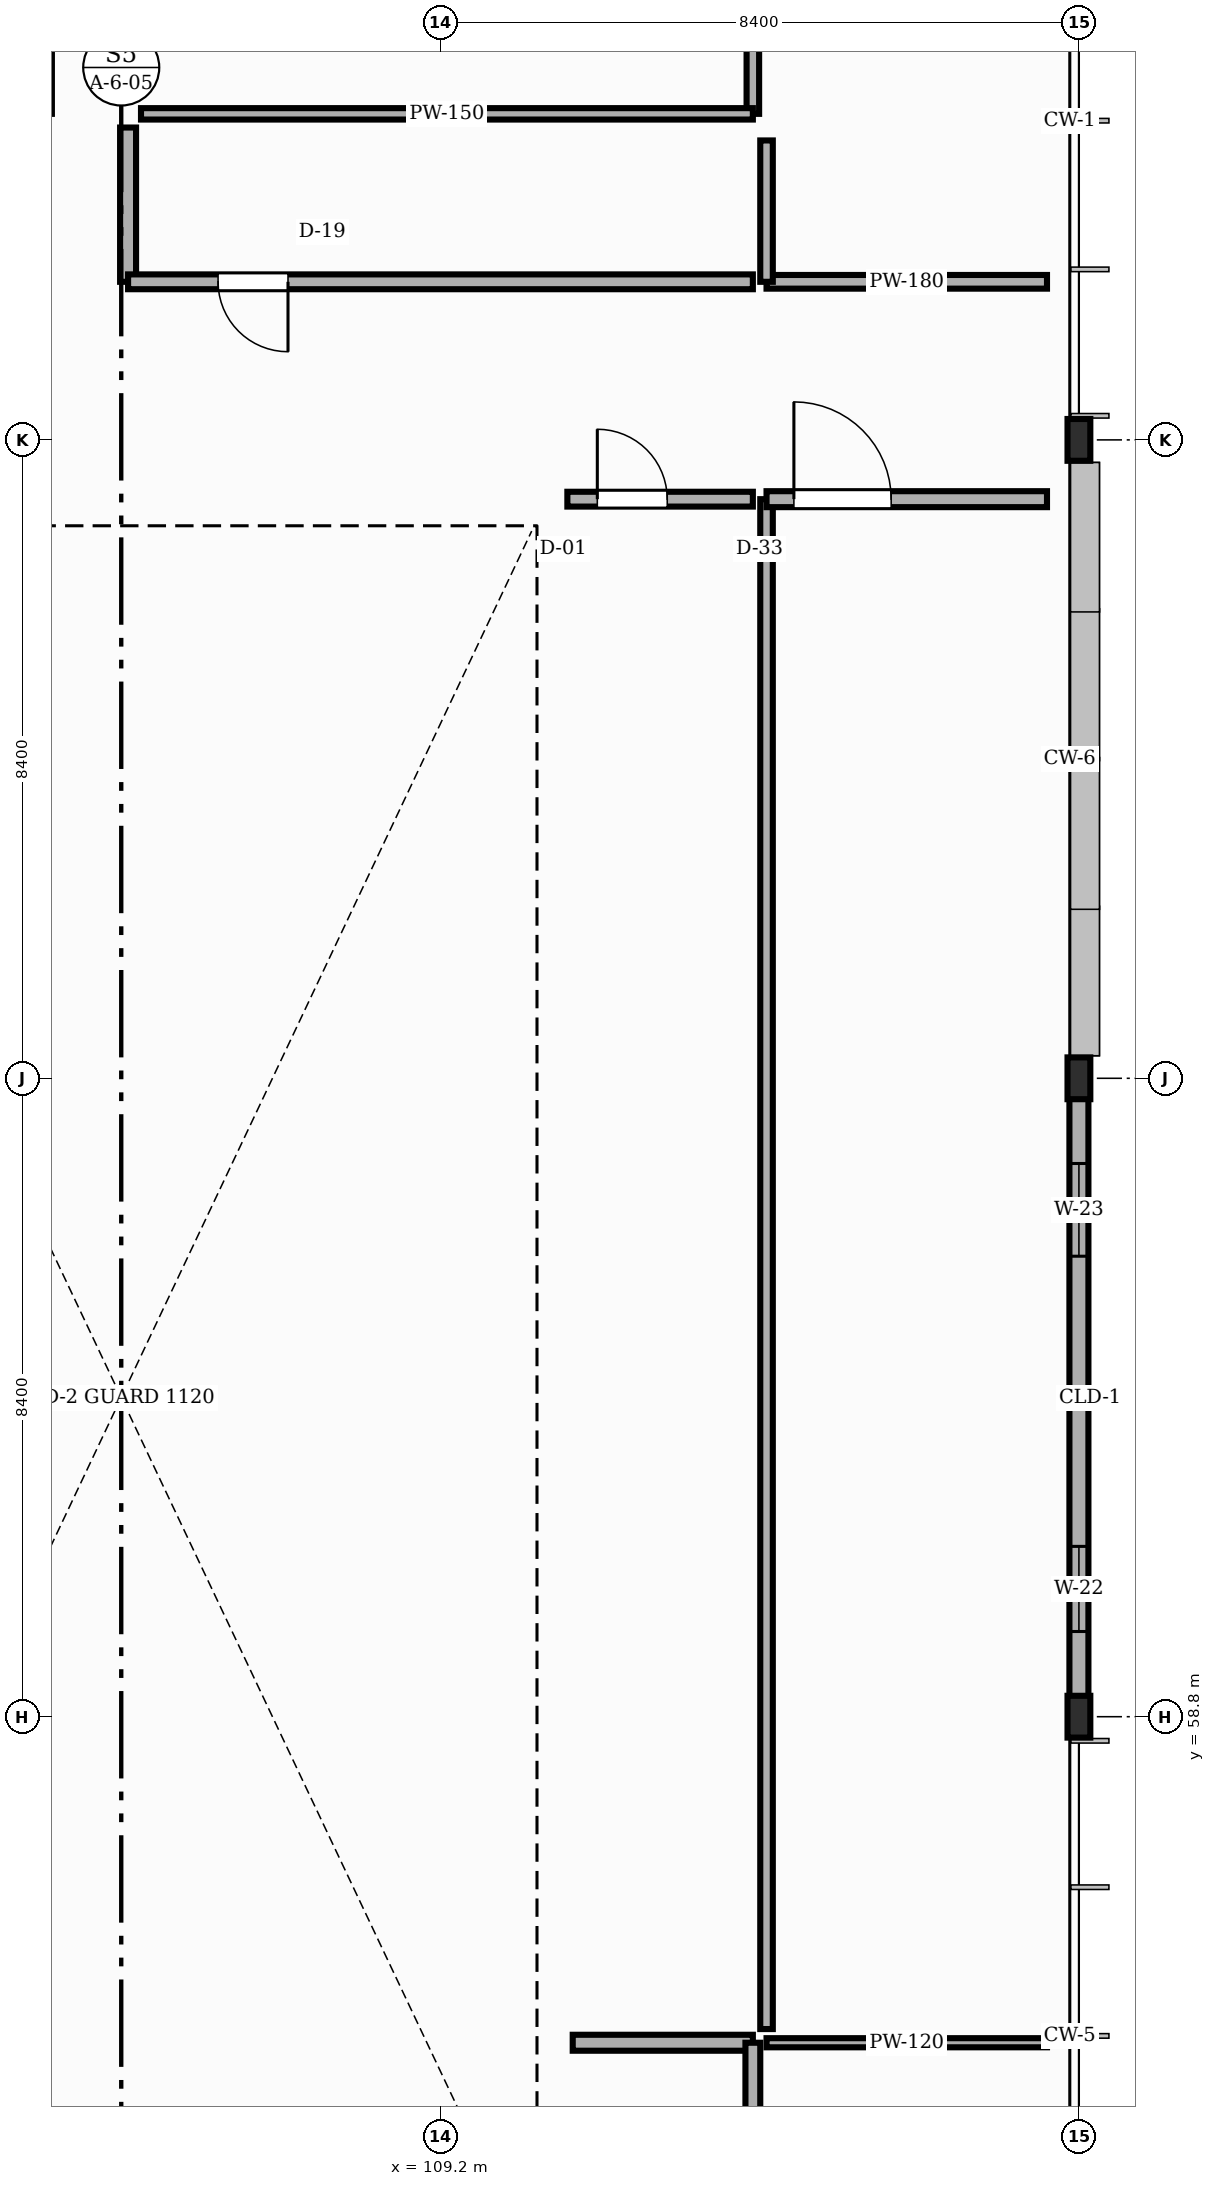
"""IFC4 building model, lengths in metres.
Left out: names, types, materials, properties, quantities, classifications, styles, units other than length and angle.
Written with IfcOpenShell. Run it as: python <this file> out.ifc"""

import sys

from ifc_helpers import new_model, si_unit, direction, frame, frame_2d, origin, origin_2d, place, context, subcontext, project, spatial, rectangle, i_section, extrude, element, fill, save


model = new_model("IFC4")
c1 = context("Model", 3, precision=1e-05, world=origin(), true_north=direction((0.0, 1.0)))
c2 = subcontext(c1, "Body", "Model", "MODEL_VIEW")
j1 = project(units=[si_unit("LENGTHUNIT", "METRE"), si_unit("PLANEANGLEUNIT", "RADIAN")], contexts=[c1])
p1 = place(None, origin())
s1 = spatial("IfcSite", under=j1, at=p1, CompositionType="ELEMENT")
p2 = place(p1, origin())
s2 = spatial("IfcBuilding", under=s1, at=p2, CompositionType="ELEMENT")
p3 = place(p2, frame((0.0, 0.0, 9.9)))
s3 = spatial("IfcBuildingStorey", under=s2, at=p3, CompositionType="ELEMENT", Elevation=9.9)
for number, where, z_axis, x_axis in (
    (1, (117.6, 58.8, 0.0), (0.0, 0.0, 1.0), (1.0, 0.0, 0.0)),
    (2, (117.6, 67.2, 0.0), (0.0, 0.0, 1.0), (1.0, 0.0, 0.0)),
    (3, (117.6, 75.6, 0.0), (0.0, 0.0, 1.0), (1.0, 0.0, 0.0)),
):
    element("IfcColumn", number, at=place(p3, frame(where, z_axis=z_axis, x_axis=x_axis)), inside=s3, PredefinedType="COLUMN", context=c2, shape_type="SweptSolid", body=[
        extrude(i_section(OverallWidth=0.3, OverallDepth=0.55, WebThickness=0.015, FlangeThickness=0.029, FilletRadius=0.027, at=origin_2d()), origin(), (0.0, 0.0, 1.0), 4.05),
    ])
p4 = place(p3, frame((117.6, 59.071, 0.0), z_axis=(0.0, 0.0, 1.0), x_axis=(0.0, 1.0, 0.0)))
e4 = element("IfcWall", 4, at=p4, inside=s3, PredefinedType="STANDARD", context=c2, shape_type="SweptSolid", body=[
    extrude(rectangle(XDim=7.858, YDim=0.25, at=frame_2d((3.929, 0.0))), origin(), (0.0, 0.0, 1.0), 3.562),
])
p5 = place(p4, frame((0.85, 0.0, 0.9)))
e5 = element("IfcOpeningElement", 5, at=p5, cuts=e4, PredefinedType="OPENING", context=c2, shape_type="SweptSolid", body=[
    extrude(rectangle(XDim=1.12, YDim=1.45, at=frame_2d((0.56, 0.725))), frame((0.0, 0.135, 0.0), z_axis=(0.0, -1.0, 0.0), x_axis=(1.0, 0.0, 0.0)), (0.0, 0.0, 1.0), 0.27),
])
p6 = place(p4, frame((5.788, 0.0, 0.9)))
e6 = element("IfcOpeningElement", 6, at=p6, cuts=e4, PredefinedType="OPENING", context=c2, shape_type="SweptSolid", body=[
    extrude(rectangle(XDim=1.22, YDim=1.45, at=frame_2d((0.61, 0.725))), frame((0.0, 0.135, 0.0), z_axis=(0.0, -1.0, 0.0), x_axis=(1.0, 0.0, 0.0)), (0.0, 0.0, 1.0), 0.27),
])
p7 = place(p3, frame((113.31, 97.9, -0.004), z_axis=(0.0, 0.0, 1.0), x_axis=(0.0, -1.0, 0.0)))
e7 = element("IfcWall", 7, at=p7, inside=s3, PredefinedType="STANDARD", context=c2, shape_type="SweptSolid", body=[
    extrude(rectangle(XDim=18.01, YDim=0.165, at=frame_2d((9.005, 0.0))), origin(), (0.0, 0.0, 1.0), 3.844),
])
p8 = place(p3, frame((113.31, 79.89, -0.004), z_axis=(0.0, 0.0, 1.0), x_axis=(-1.0, 0.0, 0.0)))
e8 = element("IfcWall", 8, at=p8, inside=s3, PredefinedType="STANDARD", context=c2, shape_type="SweptSolid", body=[
    extrude(rectangle(XDim=8.05, YDim=0.15, at=frame_2d((4.025, 0.0))), origin(), (0.0, 0.0, 1.0), 3.844),
])
p9 = place(p3, frame((110.94, 54.51, -0.004), z_axis=(0.0, 0.0, 1.0), x_axis=(1.0, 0.0, 0.0)))
e9 = element("IfcWall", 9, at=p9, inside=s3, PredefinedType="STANDARD", context=c2, shape_type="SweptSolid", body=[
    extrude(rectangle(XDim=2.37, YDim=0.21, at=frame_2d((1.185, 0.0))), origin(), (0.0, 0.0, 1.0), 3.844),
])
p10 = place(p3, frame((113.31, 54.51, -0.004), z_axis=(0.0, 0.0, 1.0), x_axis=(0.0, -1.0, 0.0)))
e10 = element("IfcWall", 10, at=p10, inside=s3, PredefinedType="STANDARD", context=c2, shape_type="SweptSolid", body=[
    extrude(rectangle(XDim=21.53, YDim=0.195, at=frame_2d((10.765, 0.0))), origin(), (0.0, 0.0, 1.0), 3.844),
])
p11 = place(p3, frame((117.18, 77.68, -0.004), z_axis=(0.0, 0.0, 1.0), x_axis=(-1.0, 0.0, 0.0)))
e11 = element("IfcWall", 11, at=p11, inside=s3, PredefinedType="STANDARD", context=c2, shape_type="SweptSolid", body=[
    extrude(rectangle(XDim=3.69, YDim=0.18, at=frame_2d((1.845, 0.0))), origin(), (0.0, 0.0, 1.0), 3.844),
])
p12 = place(p3, frame((113.49, 77.68, -0.004), z_axis=(0.0, 0.0, 1.0), x_axis=(0.0, 1.0, 0.0)))
e12 = element("IfcWall", 12, at=p12, inside=s3, PredefinedType="STANDARD", context=c2, shape_type="SweptSolid", body=[
    extrude(rectangle(XDim=1.86, YDim=0.165, at=frame_2d((0.93, 0.0))), origin(), (0.0, 0.0, 1.0), 3.844),
])
p13 = place(p3, frame((113.49, 54.51, -0.004), z_axis=(0.0, 0.0, 1.0), x_axis=(1.0, 0.0, 0.0)))
e13 = element("IfcWall", 13, at=p13, inside=s3, PredefinedType="STANDARD", context=c2, shape_type="SweptSolid", body=[
    extrude(rectangle(XDim=3.69, YDim=0.12, at=frame_2d((1.845, 0.0))), origin(), (0.0, 0.0, 1.0), 3.844),
])
p14 = place(p3, frame((113.49, 54.69, -0.004), z_axis=(0.0, 0.0, 1.0), x_axis=(0.0, 1.0, 0.0)))
e14 = element("IfcWall", 14, at=p14, inside=s3, PredefinedType="STANDARD", context=c2, shape_type="SweptSolid", body=[
    extrude(rectangle(XDim=20.13, YDim=0.165, at=frame_2d((10.065, 0.0))), origin(), (0.0, 0.0, 1.0), 3.844),
])
p15 = place(p3, frame((113.49, 74.82, -0.004), z_axis=(0.0, 0.0, 1.0), x_axis=(1.0, 0.0, 0.0)))
e15 = element("IfcWall", 15, at=p15, inside=s3, PredefinedType="STANDARD", context=c2, shape_type="SweptSolid", body=[
    extrude(rectangle(XDim=3.69, YDim=0.21, at=frame_2d((1.845, 0.0))), origin(), (0.0, 0.0, 1.0), 3.844),
])
p16 = place(p15, frame((0.36, 0.0, 0.0)))
e16 = element("IfcOpeningElement", 16, at=p16, cuts=e15, PredefinedType="OPENING", context=c2, shape_type="SweptSolid", body=[
    extrude(rectangle(XDim=1.28, YDim=2.3, at=frame_2d((0.64, 1.15))), frame((0.0, 0.115, 0.0), z_axis=(0.0, -1.0, 0.0), x_axis=(1.0, 0.0, 0.0)), (0.0, 0.0, 1.0), 0.23),
])
p17 = place(p3, frame((110.87, 74.82, -0.004), z_axis=(0.0, 0.0, 1.0), x_axis=(1.0, 0.0, 0.0)))
e17 = element("IfcWall", 17, at=p17, inside=s3, PredefinedType="STANDARD", context=c2, shape_type="SweptSolid", body=[
    extrude(rectangle(XDim=2.44, YDim=0.195, at=frame_2d((1.22, 0.0))), origin(), (0.0, 0.0, 1.0), 3.844),
])
p18 = place(p17, frame((0.394, 0.0, 0.0)))
e18 = element("IfcOpeningElement", 18, at=p18, cuts=e17, PredefinedType="OPENING", context=c2, shape_type="SweptSolid", body=[
    extrude(rectangle(XDim=0.92, YDim=2.06, at=frame_2d((0.46, 1.03))), frame((0.0, 0.107, 0.0), z_axis=(0.0, -1.0, 0.0), x_axis=(1.0, 0.0, 0.0)), (0.0, 0.0, 1.0), 0.215),
])
p19 = place(p3, frame((105.09, 77.68, -0.004), z_axis=(0.0, 0.0, 1.0), x_axis=(0.0, 1.0, 0.0)))
e19 = element("IfcWall", 19, at=p19, inside=s3, PredefinedType="STANDARD", context=c2, shape_type="SweptSolid", body=[
    extrude(rectangle(XDim=2.03, YDim=0.21, at=frame_2d((1.015, 0.0))), origin(), (0.0, 0.0, 1.0), 3.844),
])
p20 = place(p3, frame((113.31, 77.68, -0.004), z_axis=(0.0, 0.0, 1.0), x_axis=(-1.0, 0.0, 0.0)))
e20 = element("IfcWall", 20, at=p20, inside=s3, PredefinedType="STANDARD", context=c2, shape_type="SweptSolid", body=[
    extrude(rectangle(XDim=8.22, YDim=0.195, at=frame_2d((4.11, 0.0))), origin(), (0.0, 0.0, 1.0), 3.844),
])
p21 = place(p20, frame((6.116, 0.0, 0.0)))
e21 = element("IfcOpeningElement", 21, at=p21, cuts=e20, PredefinedType="OPENING", context=c2, shape_type="SweptSolid", body=[
    extrude(rectangle(XDim=0.92, YDim=2.22, at=frame_2d((0.46, 1.11))), frame((0.0, 0.107, 0.0), z_axis=(0.0, -1.0, 0.0), x_axis=(1.0, 0.0, 0.0)), (0.0, 0.0, 1.0), 0.215),
])
p22 = place(p5, origin())
e22 = element("IfcWindow", 22, at=p22, inside=s3, PartitioningType="SINGLE_PANEL", PredefinedType="WINDOW", context=c2, shape_type="SweptSolid", body=[
    extrude(rectangle(XDim=1.12, YDim=1.45, at=frame_2d((0.56, 0.725))), frame((0.0, 0.03, 0.0), z_axis=(0.0, -1.0, 0.0), x_axis=(1.0, 0.0, 0.0)), (0.0, 0.0, 1.0), 0.06),
])
fill(e5, e22)
p23 = place(p6, origin())
e23 = element("IfcWindow", 23, at=p23, inside=s3, PartitioningType="SINGLE_PANEL", PredefinedType="WINDOW", context=c2, shape_type="SweptSolid", body=[
    extrude(rectangle(XDim=1.22, YDim=1.45, at=frame_2d((0.61, 0.725))), frame((0.0, 0.03, 0.0), z_axis=(0.0, -1.0, 0.0), x_axis=(1.0, 0.0, 0.0)), (0.0, 0.0, 1.0), 0.06),
])
fill(e6, e23)
p24 = place(p16, origin())
e24 = element("IfcDoor", 24, at=p24, inside=s3, OperationType="SINGLE_SWING_LEFT", PredefinedType="DOOR", context=c2, shape_type="SweptSolid", body=[
    extrude(rectangle(XDim=1.28, YDim=2.3, at=frame_2d((0.64, 1.15))), frame((0.0, 0.025, 0.0), z_axis=(0.0, -1.0, 0.0), x_axis=(1.0, 0.0, 0.0)), (0.0, 0.0, 1.0), 0.05),
])
fill(e16, e24)
p25 = place(p18, origin())
e25 = element("IfcDoor", 25, at=p25, inside=s3, OperationType="SINGLE_SWING_LEFT", PredefinedType="DOOR", context=c2, shape_type="SweptSolid", body=[
    extrude(rectangle(XDim=0.92, YDim=2.06, at=frame_2d((0.46, 1.03))), frame((0.0, 0.025, 0.0), z_axis=(0.0, -1.0, 0.0), x_axis=(1.0, 0.0, 0.0)), (0.0, 0.0, 1.0), 0.05),
])
fill(e18, e25)
p26 = place(p21, origin())
e26 = element("IfcDoor", 26, at=p26, inside=s3, OperationType="SINGLE_SWING_LEFT", PredefinedType="DOOR", context=c2, shape_type="SweptSolid", body=[
    extrude(rectangle(XDim=0.92, YDim=2.22, at=frame_2d((0.46, 1.11))), frame((0.0, 0.025, 0.0), z_axis=(0.0, -1.0, 0.0), x_axis=(1.0, 0.0, 0.0)), (0.0, 0.0, 1.0), 0.05),
])
fill(e21, e26)
save(model, sys.argv[1])
